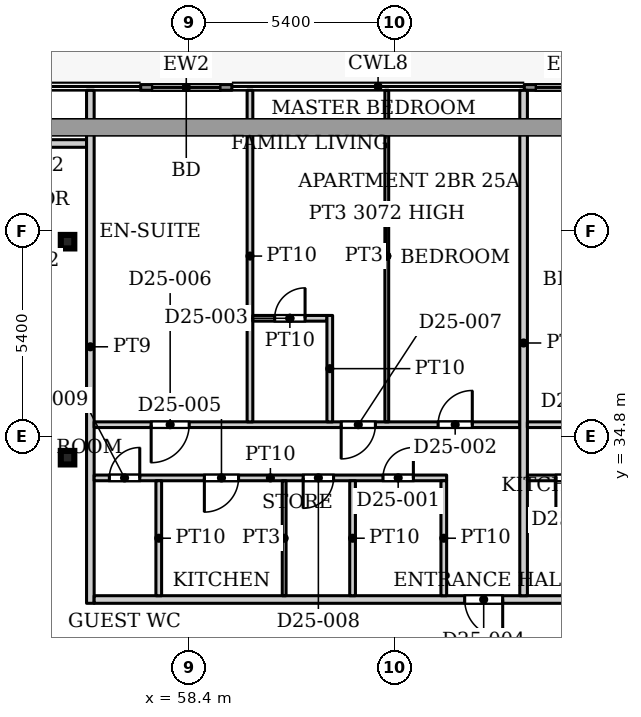
"""IFC4 building model, lengths in metres.
Left out: names, types, materials, properties, quantities, classifications, styles, units other than length and angle.
Written with IfcOpenShell. Run it as: python <this file> out.ifc"""

import sys

from ifc_helpers import new_model, si_unit, direction, frame, frame_2d, origin, origin_2d, place, context, subcontext, project, spatial, rectangle, hollow_rectangle, extrude, source, transform, mapped, element, fill, save


model = new_model("IFC4")
c1 = context("Model", 3, precision=1e-05, world=origin(), true_north=direction((0.0, 1.0)))
c2 = subcontext(c1, "Body", "Model", "MODEL_VIEW")
j1 = project(units=[si_unit("LENGTHUNIT", "METRE"), si_unit("PLANEANGLEUNIT", "RADIAN")], contexts=[c1])
p1 = place(None, origin())
s1 = spatial("IfcSite", under=j1, at=p1, CompositionType="ELEMENT")
p2 = place(p1, origin())
s2 = spatial("IfcBuilding", under=s1, at=p2, CompositionType="ELEMENT")
p3 = place(p2, frame((0.0, 0.0, 109.7)))
s3 = spatial("IfcBuildingStorey", under=s2, at=p3, CompositionType="ELEMENT", Elevation=109.7)
for number, where, z_axis, x_axis in (
    (1, (55.2, 34.232, 0.0), (0.0, 0.0, 1.0), (1.0, 0.0, 0.0)),
    (2, (55.2, 39.916, 0.0), (0.0, 0.0, 1.0), (1.0, 0.0, 0.0)),
):
    element("IfcColumn", number, at=place(p3, frame(where, z_axis=z_axis, x_axis=x_axis)), inside=s3, PredefinedType="COLUMN", context=c2, shape_type="SweptSolid", body=[
        extrude(hollow_rectangle(XDim=0.356, YDim=0.356, WallThickness=0.016, InnerFilletRadius=0.016, OuterFilletRadius=0.032, at=origin_2d()), origin(), (0.0, 0.0, 1.0), 3.9),
    ])
p4 = place(p3, frame((57.124, 43.975, 0.0), z_axis=(0.0, 0.0, 1.0), x_axis=(1.0, 0.0, 0.0)))
e3 = element("IfcWall", 3, at=p4, inside=s3, PredefinedType="SOLIDWALL", context=c2, shape_type="SweptSolid", body=[
    extrude(rectangle(XDim=2.4, YDim=0.15, at=frame_2d((1.2, 0.0))), origin(), (0.0, 0.0, 1.0), 3.75),
])
p5 = place(p4, frame((0.3, 0.0, 0.0)))
e4 = element("IfcOpeningElement", 4, at=p5, cuts=e3, PredefinedType="OPENING", context=c2, shape_type="SweptSolid", body=[
    extrude(rectangle(XDim=1.8, YDim=2.4, at=frame_2d((0.9, 1.2))), frame((0.0, 0.085, 0.0), z_axis=(0.0, -1.0, 0.0), x_axis=(1.0, 0.0, 0.0)), (0.0, 0.0, 1.0), 0.17),
])
p6 = place(p3, frame((67.218, 43.975, 0.0), z_axis=(0.0, 0.0, 1.0), x_axis=(1.0, 0.0, 0.0)))
e5 = element("IfcWall", 5, at=p6, inside=s3, PredefinedType="SOLIDWALL", context=c2, shape_type="SweptSolid", body=[
    extrude(rectangle(XDim=2.4, YDim=0.15, at=frame_2d((1.2, 0.0))), origin(), (0.0, 0.0, 1.0), 3.75),
])
p7 = place(p6, frame((0.3, 0.0, 0.0)))
e6 = element("IfcOpeningElement", 6, at=p7, cuts=e5, PredefinedType="OPENING", context=c2, shape_type="SweptSolid", body=[
    extrude(rectangle(XDim=1.8, YDim=2.4, at=frame_2d((0.9, 1.2))), frame((0.0, 0.085, 0.0), z_axis=(0.0, -1.0, 0.0), x_axis=(1.0, 0.0, 0.0)), (0.0, 0.0, 1.0), 0.17),
])
p8 = place(p3, frame((53.5, 42.5, 0.0), z_axis=(0.0, 0.0, 1.0), x_axis=(1.0, 0.0, 0.0)))
e7 = element("IfcWall", 7, at=p8, inside=s3, PredefinedType="PARTITIONING", context=c2, shape_type="SweptSolid", body=[
    extrude(rectangle(XDim=2.2, YDim=0.2, at=frame_2d((1.1, 0.0))), origin(), (0.0, 0.0, 1.0), 3.6),
])
p9 = place(p3, frame((55.8, 30.4, 0.0), z_axis=(0.0, 0.0, 1.0), x_axis=(0.0, 1.0, 0.0)))
e8 = element("IfcWall", 8, at=p9, inside=s3, PredefinedType="PARTITIONING", context=c2, shape_type="SweptSolid", body=[
    extrude(rectangle(XDim=13.5, YDim=0.2, at=frame_2d((6.75, 0.0))), origin(), (0.0, 0.0, 1.0), 3.6),
])
p10 = place(p3, frame((55.9, 30.5, 0.0), z_axis=(0.0, 0.0, 1.0), x_axis=(1.0, 0.0, 0.0)))
e9 = element("IfcWall", 9, at=p10, inside=s3, PredefinedType="PARTITIONING", context=c2, shape_type="SweptSolid", body=[
    extrude(rectangle(XDim=42.2, YDim=0.2, at=frame_2d((21.1, 0.0))), origin(), (0.0, 0.0, 1.0), 3.6),
])
p11 = place(p10, frame((9.75, 0.0, 0.0)))
e10 = element("IfcOpeningElement", 10, at=p11, cuts=e9, PredefinedType="OPENING", context=c2, shape_type="SweptSolid", body=[
    extrude(rectangle(XDim=1.0, YDim=2.1, at=frame_2d((0.5, 1.05))), frame((0.0, 0.11, 0.0), z_axis=(0.0, -1.0, 0.0), x_axis=(1.0, 0.0, 0.0)), (0.0, 0.0, 1.0), 0.22),
])
p12 = place(p10, frame((18.6, 0.0, 0.0)))
e11 = element("IfcOpeningElement", 11, at=p12, cuts=e9, PredefinedType="OPENING", context=c2, shape_type="SweptSolid", body=[
    extrude(rectangle(XDim=1.0, YDim=2.1, at=frame_2d((0.5, 1.05))), frame((0.0, 0.11, 0.0), z_axis=(0.0, -1.0, 0.0), x_axis=(1.0, 0.0, 0.0)), (0.0, 0.0, 1.0), 0.22),
])
p13 = place(p10, frame((23.4, 0.0, 0.0)))
e12 = element("IfcOpeningElement", 12, at=p13, cuts=e9, PredefinedType="OPENING", context=c2, shape_type="SweptSolid", body=[
    extrude(rectangle(XDim=1.0, YDim=2.1, at=frame_2d((0.5, 1.05))), frame((0.0, 0.11, 0.0), z_axis=(0.0, -1.0, 0.0), x_axis=(1.0, 0.0, 0.0)), (0.0, 0.0, 1.0), 0.22),
])
p14 = place(p10, frame((40.2, 0.0, 0.0)))
e13 = element("IfcOpeningElement", 13, at=p14, cuts=e9, PredefinedType="OPENING", context=c2, shape_type="SweptSolid", body=[
    extrude(rectangle(XDim=1.0, YDim=2.1, at=frame_2d((0.5, 1.05))), frame((0.0, 0.11, 0.0), z_axis=(0.0, -1.0, 0.0), x_axis=(1.0, 0.0, 0.0)), (0.0, 0.0, 1.0), 0.22),
])
p15 = place(p3, frame((55.9, 33.7, 0.0), z_axis=(0.0, 0.0, 1.0), x_axis=(1.0, 0.0, 0.0)))
e14 = element("IfcWall", 14, at=p15, inside=s3, PredefinedType="PARTITIONING", context=c2, shape_type="SweptSolid", body=[
    extrude(rectangle(XDim=9.275, YDim=0.15, at=frame_2d((4.638, 0.0))), origin(), (0.0, 0.0, 1.0), 3.6),
])
p16 = place(p15, frame((7.6, 0.0, 0.0)))
e15 = element("IfcOpeningElement", 15, at=p16, cuts=e14, PredefinedType="OPENING", context=c2, shape_type="SweptSolid", body=[
    extrude(rectangle(XDim=0.8, YDim=2.1, at=frame_2d((0.4, 1.05))), frame((0.0, 0.085, 0.0), z_axis=(0.0, -1.0, 0.0), x_axis=(1.0, 0.0, 0.0)), (0.0, 0.0, 1.0), 0.17),
])
p17 = place(p15, frame((2.9, 0.0, 0.0)))
e16 = element("IfcOpeningElement", 16, at=p17, cuts=e14, PredefinedType="OPENING", context=c2, shape_type="SweptSolid", body=[
    extrude(rectangle(XDim=0.9, YDim=2.1, at=frame_2d((0.45, 1.05))), frame((0.0, 0.085, 0.0), z_axis=(0.0, -1.0, 0.0), x_axis=(1.0, 0.0, 0.0)), (0.0, 0.0, 1.0), 0.17),
])
p18 = place(p15, frame((5.5, 0.0, 0.0)))
e17 = element("IfcOpeningElement", 17, at=p18, cuts=e14, PredefinedType="OPENING", context=c2, shape_type="SweptSolid", body=[
    extrude(rectangle(XDim=0.8, YDim=2.1, at=frame_2d((0.4, 1.05))), frame((0.0, 0.085, 0.0), z_axis=(0.0, -1.0, 0.0), x_axis=(1.0, 0.0, 0.0)), (0.0, 0.0, 1.0), 0.17),
])
p19 = place(p15, frame((0.4, 0.0, 0.0)))
e18 = element("IfcOpeningElement", 18, at=p19, cuts=e14, PredefinedType="OPENING", context=c2, shape_type="SweptSolid", body=[
    extrude(rectangle(XDim=0.8, YDim=2.1, at=frame_2d((0.4, 1.05))), frame((0.0, 0.085, 0.0), z_axis=(0.0, -1.0, 0.0), x_axis=(1.0, 0.0, 0.0)), (0.0, 0.0, 1.0), 0.17),
])
p20 = place(p3, frame((55.9, 35.1, 0.0), z_axis=(0.0, 0.0, 1.0), x_axis=(1.0, 0.0, 0.0)))
e19 = element("IfcWall", 19, at=p20, inside=s3, PredefinedType="PARTITIONING", context=c2, shape_type="SweptSolid", body=[
    extrude(rectangle(XDim=11.2, YDim=0.15, at=frame_2d((5.6, 0.0))), origin(), (0.0, 0.0, 1.0), 3.6),
])
p21 = place(p20, frame((9.05, 0.0, 0.0)))
e20 = element("IfcOpeningElement", 20, at=p21, cuts=e19, PredefinedType="OPENING", context=c2, shape_type="SweptSolid", body=[
    extrude(rectangle(XDim=0.9, YDim=2.1, at=frame_2d((0.45, 1.05))), frame((0.0, 0.085, 0.0), z_axis=(0.0, -1.0, 0.0), x_axis=(1.0, 0.0, 0.0)), (0.0, 0.0, 1.0), 0.17),
])
p22 = place(p20, frame((1.5, 0.0, 0.0)))
e21 = element("IfcOpeningElement", 21, at=p22, cuts=e19, PredefinedType="OPENING", context=c2, shape_type="SweptSolid", body=[
    extrude(rectangle(XDim=1.0, YDim=2.1, at=frame_2d((0.5, 1.05))), frame((0.0, 0.085, 0.0), z_axis=(0.0, -1.0, 0.0), x_axis=(1.0, 0.0, 0.0)), (0.0, 0.0, 1.0), 0.17),
])
p23 = place(p20, frame((6.5, 0.0, 0.0)))
e22 = element("IfcOpeningElement", 22, at=p23, cuts=e19, PredefinedType="OPENING", context=c2, shape_type="SweptSolid", body=[
    extrude(rectangle(XDim=0.9, YDim=2.1, at=frame_2d((0.45, 1.05))), frame((0.0, 0.085, 0.0), z_axis=(0.0, -1.0, 0.0), x_axis=(1.0, 0.0, 0.0)), (0.0, 0.0, 1.0), 0.17),
])
p24 = place(p3, frame((57.6, 30.6, 0.0), z_axis=(0.0, 0.0, 1.0), x_axis=(0.0, 1.0, 0.0)))
e23 = element("IfcWall", 23, at=p24, inside=s3, PredefinedType="PARTITIONING", context=c2, shape_type="SweptSolid", body=[
    extrude(rectangle(XDim=3.025, YDim=0.15, at=frame_2d((1.512, 0.0))), origin(), (0.0, 0.0, 1.0), 3.6),
])
p25 = place(p3, frame((60.0, 35.175, 0.0), z_axis=(0.0, 0.0, 1.0), x_axis=(0.0, 1.0, 0.0)))
e24 = element("IfcWall", 24, at=p25, inside=s3, PredefinedType="PARTITIONING", context=c2, shape_type="SweptSolid", body=[
    extrude(rectangle(XDim=8.725, YDim=0.15, at=frame_2d((4.362, 0.0))), origin(), (0.0, 0.0, 1.0), 3.6),
])
p26 = place(p3, frame((60.075, 37.9, 0.0), z_axis=(0.0, 0.0, 1.0), x_axis=(1.0, 0.0, 0.0)))
e25 = element("IfcWall", 25, at=p26, inside=s3, PredefinedType="PARTITIONING", context=c2, shape_type="SweptSolid", body=[
    extrude(rectangle(XDim=1.95, YDim=0.15, at=frame_2d((0.975, 0.0))), origin(), (0.0, 0.0, 1.0), 3.6),
])
p27 = place(p26, frame((0.575, 0.0, 0.0)))
e26 = element("IfcOpeningElement", 26, at=p27, cuts=e25, PredefinedType="OPENING", context=c2, shape_type="SweptSolid", body=[
    extrude(rectangle(XDim=0.8, YDim=2.1, at=frame_2d((0.4, 1.05))), frame((0.0, 0.085, 0.0), z_axis=(0.0, -1.0, 0.0), x_axis=(1.0, 0.0, 0.0)), (0.0, 0.0, 1.0), 0.17),
])
p28 = place(p3, frame((60.9, 30.6, 0.0), z_axis=(0.0, 0.0, 1.0), x_axis=(0.0, 1.0, 0.0)))
e27 = element("IfcWall", 27, at=p28, inside=s3, PredefinedType="PARTITIONING", context=c2, shape_type="SweptSolid", body=[
    extrude(rectangle(XDim=3.025, YDim=0.1, at=frame_2d((1.512, 0.0))), origin(), (0.0, 0.0, 1.0), 3.6),
])
p29 = place(p3, frame((62.1, 35.175, 0.0), z_axis=(0.0, 0.0, 1.0), x_axis=(0.0, 1.0, 0.0)))
e28 = element("IfcWall", 28, at=p29, inside=s3, PredefinedType="PARTITIONING", context=c2, shape_type="SweptSolid", body=[
    extrude(rectangle(XDim=2.8, YDim=0.15, at=frame_2d((1.4, 0.0))), origin(), (0.0, 0.0, 1.0), 3.6),
])
p30 = place(p3, frame((62.7, 30.6, 0.0), z_axis=(0.0, 0.0, 1.0), x_axis=(0.0, 1.0, 0.0)))
e29 = element("IfcWall", 29, at=p30, inside=s3, PredefinedType="PARTITIONING", context=c2, shape_type="SweptSolid", body=[
    extrude(rectangle(XDim=3.025, YDim=0.15, at=frame_2d((1.512, 0.0))), origin(), (0.0, 0.0, 1.0), 3.6),
])
p31 = place(p3, frame((63.6, 35.175, 0.0), z_axis=(0.0, 0.0, 1.0), x_axis=(0.0, 1.0, 0.0)))
e30 = element("IfcWall", 30, at=p31, inside=s3, PredefinedType="PARTITIONING", context=c2, shape_type="SweptSolid", body=[
    extrude(rectangle(XDim=8.725, YDim=0.1, at=frame_2d((4.362, 0.0))), origin(), (0.0, 0.0, 1.0), 3.072),
])
p32 = place(p3, frame((65.1, 30.6, 0.0), z_axis=(0.0, 0.0, 1.0), x_axis=(0.0, 1.0, 0.0)))
e31 = element("IfcWall", 31, at=p32, inside=s3, PredefinedType="PARTITIONING", context=c2, shape_type="SweptSolid", body=[
    extrude(rectangle(XDim=3.025, YDim=0.15, at=frame_2d((1.512, 0.0))), origin(), (0.0, 0.0, 1.0), 3.6),
])
p33 = place(p3, frame((67.2, 30.6, 0.0), z_axis=(0.0, 0.0, 1.0), x_axis=(0.0, 1.0, 0.0)))
e32 = element("IfcWall", 32, at=p33, inside=s3, PredefinedType="PARTITIONING", context=c2, shape_type="SweptSolid", body=[
    extrude(rectangle(XDim=13.3, YDim=0.2, at=frame_2d((6.65, 0.0))), origin(), (0.0, 0.0, 1.0), 3.6),
])
p34 = place(p3, frame((67.3, 33.7, 0.0), z_axis=(0.0, 0.0, 1.0), x_axis=(1.0, 0.0, 0.0)))
e33 = element("IfcWall", 33, at=p34, inside=s3, PredefinedType="PARTITIONING", context=c2, shape_type="SweptSolid", body=[
    extrude(rectangle(XDim=6.875, YDim=0.15, at=frame_2d((3.438, 0.0))), origin(), (0.0, 0.0, 1.0), 3.6),
])
p35 = place(p34, frame((3.7, 0.0, 0.0)))
e34 = element("IfcOpeningElement", 34, at=p35, cuts=e33, PredefinedType="OPENING", context=c2, shape_type="SweptSolid", body=[
    extrude(rectangle(XDim=0.8, YDim=2.1, at=frame_2d((0.4, 1.05))), frame((0.0, 0.085, 0.0), z_axis=(0.0, -1.0, 0.0), x_axis=(1.0, 0.0, 0.0)), (0.0, 0.0, 1.0), 0.17),
])
p36 = place(p34, frame((0.75, 0.0, 0.0)))
e35 = element("IfcOpeningElement", 35, at=p36, cuts=e33, PredefinedType="OPENING", context=c2, shape_type="SweptSolid", body=[
    extrude(rectangle(XDim=0.9, YDim=2.1, at=frame_2d((0.45, 1.05))), frame((0.0, 0.085, 0.0), z_axis=(0.0, -1.0, 0.0), x_axis=(1.0, 0.0, 0.0)), (0.0, 0.0, 1.0), 0.17),
])
p37 = place(p34, frame((5.65, 0.0, 0.0)))
e36 = element("IfcOpeningElement", 36, at=p37, cuts=e33, PredefinedType="OPENING", context=c2, shape_type="SweptSolid", body=[
    extrude(rectangle(XDim=0.8, YDim=2.1, at=frame_2d((0.4, 1.05))), frame((0.0, 0.085, 0.0), z_axis=(0.0, -1.0, 0.0), x_axis=(1.0, 0.0, 0.0)), (0.0, 0.0, 1.0), 0.17),
])
p38 = place(p3, frame((67.3, 35.1, 0.0), z_axis=(0.0, 0.0, 1.0), x_axis=(1.0, 0.0, 0.0)))
e37 = element("IfcWall", 37, at=p38, inside=s3, PredefinedType="PARTITIONING", context=c2, shape_type="SweptSolid", body=[
    extrude(rectangle(XDim=8.5, YDim=0.15, at=frame_2d((4.25, 0.0))), origin(), (0.0, 0.0, 1.0), 3.6),
])
p39 = place(p38, frame((1.0, 0.0, 0.0)))
e38 = element("IfcOpeningElement", 38, at=p39, cuts=e37, PredefinedType="OPENING", context=c2, shape_type="SweptSolid", body=[
    extrude(rectangle(XDim=0.9, YDim=2.1, at=frame_2d((0.45, 1.05))), frame((0.0, 0.085, 0.0), z_axis=(0.0, -1.0, 0.0), x_axis=(1.0, 0.0, 0.0)), (0.0, 0.0, 1.0), 0.17),
])
p40 = place(p38, frame((5.7, 0.0, 0.0)))
e39 = element("IfcOpeningElement", 39, at=p40, cuts=e37, PredefinedType="OPENING", context=c2, shape_type="SweptSolid", body=[
    extrude(rectangle(XDim=1.0, YDim=2.1, at=frame_2d((0.5, 1.05))), frame((0.0, 0.085, 0.0), z_axis=(0.0, -1.0, 0.0), x_axis=(1.0, 0.0, 0.0)), (0.0, 0.0, 1.0), 0.17),
])
m1 = source(origin(), c2, "Body", "SweptSolid", [
    extrude(rectangle(XDim=1.8, YDim=2.4, at=frame_2d((0.9, 1.2))), frame((0.0, 0.025, 0.0), z_axis=(0.0, -1.0, 0.0), x_axis=(1.0, 0.0, 0.0)), (0.0, 0.0, 1.0), 0.05),
])
p41 = place(p5, origin())
e40 = element("IfcDoor", 40, at=p41, inside=s3, OperationType="SLIDING_TO_LEFT", PredefinedType="DOOR", context=c2, shape_type="MappedRepresentation", body=[
    mapped(m1, transform((0.0, 0.0, 0.0), x_axis=(1.0, 0.0, 0.0), y_axis=(0.0, 1.0, 0.0), z_axis=(0.0, 0.0, 1.0), scale=1.0)),
])
fill(e4, e40)
p42 = place(p7, origin())
e41 = element("IfcDoor", 41, at=p42, inside=s3, OperationType="SLIDING_TO_LEFT", PredefinedType="DOOR", context=c2, shape_type="MappedRepresentation", body=[
    mapped(m1, transform((0.0, 0.0, 0.0), x_axis=(1.0, 0.0, 0.0), y_axis=(0.0, 1.0, 0.0), z_axis=(0.0, 0.0, 1.0), scale=1.0)),
])
fill(e6, e41)
m2 = source(origin(), c2, "Body", "SweptSolid", [
    extrude(rectangle(XDim=0.8, YDim=2.1, at=frame_2d((0.4, 1.05))), frame((0.0, 0.025, 0.0), z_axis=(0.0, -1.0, 0.0), x_axis=(1.0, 0.0, 0.0)), (0.0, 0.0, 1.0), 0.05),
])
p43 = place(p16, origin())
e42 = element("IfcDoor", 42, at=p43, inside=s3, OperationType="SINGLE_SWING_LEFT", PredefinedType="DOOR", context=c2, shape_type="MappedRepresentation", body=[
    mapped(m2, transform((0.0, 0.0, 0.0), x_axis=(1.0, 0.0, 0.0), y_axis=(0.0, 1.0, 0.0), z_axis=(0.0, 0.0, 1.0), scale=1.0)),
])
fill(e15, e42)
m3 = source(origin(), c2, "Body", "SweptSolid", [
    extrude(rectangle(XDim=0.9, YDim=2.1, at=frame_2d((0.45, 1.05))), frame((0.0, 0.025, 0.0), z_axis=(0.0, -1.0, 0.0), x_axis=(1.0, 0.0, 0.0)), (0.0, 0.0, 1.0), 0.05),
])
p44 = place(p21, origin())
e43 = element("IfcDoor", 43, at=p44, inside=s3, OperationType="SINGLE_SWING_LEFT", PredefinedType="DOOR", context=c2, shape_type="MappedRepresentation", body=[
    mapped(m3, transform((0.0, 0.0, 0.0), x_axis=(1.0, 0.0, 0.0), y_axis=(0.0, 1.0, 0.0), z_axis=(0.0, 0.0, 1.0), scale=1.0)),
])
fill(e20, e43)
p45 = place(p27, origin())
e44 = element("IfcDoor", 44, at=p45, inside=s3, OperationType="SINGLE_SWING_LEFT", PredefinedType="DOOR", context=c2, shape_type="MappedRepresentation", body=[
    mapped(m2, transform((0.0, 0.0, 0.0), x_axis=(1.0, 0.0, 0.0), y_axis=(0.0, 1.0, 0.0), z_axis=(0.0, 0.0, 1.0), scale=1.0)),
])
fill(e26, e44)
m4 = source(origin(), c2, "Body", "SweptSolid", [
    extrude(rectangle(XDim=1.0, YDim=2.1, at=frame_2d((0.5, 1.05))), frame((0.0, 0.025, 0.0), z_axis=(0.0, -1.0, 0.0), x_axis=(1.0, 0.0, 0.0)), (0.0, 0.0, 1.0), 0.05),
])
p46 = place(p11, origin())
e45 = element("IfcDoor", 45, at=p46, inside=s3, OperationType="SINGLE_SWING_RIGHT", PredefinedType="DOOR", context=c2, shape_type="MappedRepresentation", body=[
    mapped(m4, transform((0.0, 0.0, 0.0), x_axis=(1.0, 0.0, 0.0), y_axis=(0.0, 1.0, 0.0), z_axis=(0.0, 0.0, 1.0), scale=1.0)),
])
fill(e10, e45)
p47 = place(p17, origin())
e46 = element("IfcDoor", 46, at=p47, inside=s3, OperationType="SINGLE_SWING_RIGHT", PredefinedType="DOOR", context=c2, shape_type="MappedRepresentation", body=[
    mapped(m3, transform((0.0, 0.0, 0.0), x_axis=(1.0, 0.0, 0.0), y_axis=(0.0, 1.0, 0.0), z_axis=(0.0, 0.0, 1.0), scale=1.0)),
])
fill(e16, e46)
m5 = source(origin(), c2, "Body", "SweptSolid", [
    extrude(rectangle(XDim=1.0, YDim=2.1, at=frame_2d((0.5, 1.05))), frame((0.0, 0.025, 0.0), z_axis=(0.0, -1.0, 0.0), x_axis=(1.0, 0.0, 0.0)), (0.0, 0.0, 1.0), 0.05),
])
p48 = place(p22, origin())
e47 = element("IfcDoor", 47, at=p48, inside=s3, OperationType="SINGLE_SWING_RIGHT", PredefinedType="DOOR", context=c2, shape_type="MappedRepresentation", body=[
    mapped(m5, transform((0.0, 0.0, 0.0), x_axis=(1.0, 0.0, 0.0), y_axis=(0.0, 1.0, 0.0), z_axis=(0.0, 0.0, 1.0), scale=1.0)),
])
fill(e21, e47)
p49 = place(p23, origin())
e48 = element("IfcDoor", 48, at=p49, inside=s3, OperationType="SINGLE_SWING_RIGHT", PredefinedType="DOOR", context=c2, shape_type="MappedRepresentation", body=[
    mapped(m3, transform((0.0, 0.0, 0.0), x_axis=(1.0, 0.0, 0.0), y_axis=(0.0, 1.0, 0.0), z_axis=(0.0, 0.0, 1.0), scale=1.0)),
])
fill(e22, e48)
p50 = place(p18, origin())
e49 = element("IfcDoor", 49, at=p50, inside=s3, OperationType="SINGLE_SWING_RIGHT", PredefinedType="DOOR", context=c2, shape_type="MappedRepresentation", body=[
    mapped(m2, transform((0.0, 0.0, 0.0), x_axis=(1.0, 0.0, 0.0), y_axis=(0.0, 1.0, 0.0), z_axis=(0.0, 0.0, 1.0), scale=1.0)),
])
fill(e17, e49)
p51 = place(p19, origin())
e50 = element("IfcDoor", 50, at=p51, inside=s3, OperationType="SINGLE_SWING_LEFT", PredefinedType="DOOR", context=c2, shape_type="MappedRepresentation", body=[
    mapped(m2, transform((0.0, 0.0, 0.0), x_axis=(1.0, 0.0, 0.0), y_axis=(0.0, 1.0, 0.0), z_axis=(0.0, 0.0, 1.0), scale=1.0)),
])
fill(e18, e50)
p52 = place(p36, origin())
e51 = element("IfcDoor", 51, at=p52, inside=s3, OperationType="SINGLE_SWING_RIGHT", PredefinedType="DOOR", context=c2, shape_type="MappedRepresentation", body=[
    mapped(m3, transform((0.0, 0.0, 0.0), x_axis=(1.0, 0.0, 0.0), y_axis=(0.0, 1.0, 0.0), z_axis=(0.0, 0.0, 1.0), scale=1.0)),
])
fill(e35, e51)
save(model, sys.argv[1])
